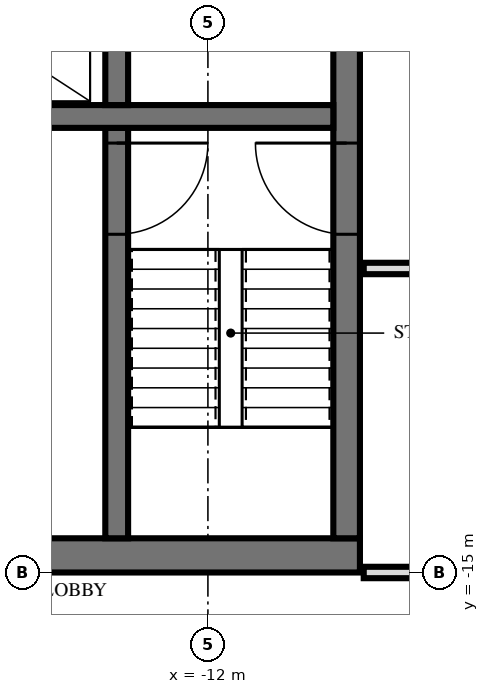
"""IFC4 building model, lengths in metres.
Left out: names, types, materials, properties, quantities, classifications, styles, units other than length and angle.
Written with IfcOpenShell. Run it as: python <this file> out.ifc"""

import sys

from ifc_helpers import new_model, si_unit, direction, frame, frame_2d, origin, place, context, subcontext, project, spatial, rectangle, extrude, element, fill, save


model = new_model("IFC4")
c1 = context("Model", 3, precision=1e-05, world=origin(), true_north=direction((0.0, 1.0)))
c2 = subcontext(c1, "Body", "Model", "MODEL_VIEW")
j1 = project(units=[si_unit("LENGTHUNIT", "METRE"), si_unit("PLANEANGLEUNIT", "RADIAN")], contexts=[c1])
p1 = place(None, origin())
s1 = spatial("IfcSite", under=j1, at=p1, CompositionType="ELEMENT")
p2 = place(p1, origin())
s2 = spatial("IfcBuilding", under=s1, at=p2, CompositionType="ELEMENT")
p3 = place(p2, frame((0.0, 0.0, 92.4)))
s3 = spatial("IfcBuildingStorey", under=s2, at=p3, CompositionType="ELEMENT", Elevation=92.4)
p4 = place(p3, frame((-29.5, -14.775, 0.0), z_axis=(0.0, 0.0, 1.0), x_axis=(1.0, 0.0, 0.0)))
e1 = element("IfcWall", 1, at=p4, inside=s3, PredefinedType="SHEAR", context=c2, shape_type="SweptSolid", body=[
    extrude(rectangle(XDim=19.5, YDim=0.45, at=frame_2d((9.75, 0.0))), origin(), (0.0, 0.0, 1.0), 3.6),
])
p5 = place(p4, frame((11.2, 0.0, 0.0)))
e2 = element("IfcOpeningElement", 2, at=p5, cuts=e1, PredefinedType="OPENING", context=c2, shape_type="SweptSolid", body=[
    extrude(rectangle(XDim=1.2, YDim=2.1, at=frame_2d((0.6, 1.05))), frame((0.0, 0.235, 0.0), z_axis=(0.0, -1.0, 0.0), x_axis=(1.0, 0.0, 0.0)), (0.0, 0.0, 1.0), 0.47),
])
p6 = place(p4, frame((14.25, 0.0, 0.0)))
e3 = element("IfcOpeningElement", 3, at=p6, cuts=e1, PredefinedType="OPENING", context=c2, shape_type="SweptSolid", body=[
    extrude(rectangle(XDim=1.1, YDim=2.1, at=frame_2d((0.55, 1.05))), frame((0.0, 0.235, 0.0), z_axis=(0.0, -1.0, 0.0), x_axis=(1.0, 0.0, 0.0)), (0.0, 0.0, 1.0), 0.47),
])
p7 = place(p4, frame((8.5, 0.0, 0.0)))
e4 = element("IfcOpeningElement", 4, at=p7, cuts=e1, PredefinedType="OPENING", context=c2, shape_type="SweptSolid", body=[
    extrude(rectangle(XDim=0.9, YDim=2.1, at=frame_2d((0.45, 1.05))), frame((0.0, 0.235, 0.0), z_axis=(0.0, -1.0, 0.0), x_axis=(1.0, 0.0, 0.0)), (0.0, 0.0, 1.0), 0.47),
])
p8 = place(p4, frame((6.05, 0.0, 0.0)))
e5 = element("IfcOpeningElement", 5, at=p8, cuts=e1, PredefinedType="OPENING", context=c2, shape_type="SweptSolid", body=[
    extrude(rectangle(XDim=1.0, YDim=2.1, at=frame_2d((0.5, 1.05))), frame((0.0, 0.235, 0.0), z_axis=(0.0, -1.0, 0.0), x_axis=(1.0, 0.0, 0.0)), (0.0, 0.0, 1.0), 0.47),
])
p9 = place(p4, frame((3.587, 0.0, 0.0)))
e6 = element("IfcOpeningElement", 6, at=p9, cuts=e1, PredefinedType="OPENING", context=c2, shape_type="SweptSolid", body=[
    extrude(rectangle(XDim=1.0, YDim=2.1, at=frame_2d((0.5, 1.05))), frame((0.0, 0.235, 0.0), z_axis=(0.0, -1.0, 0.0), x_axis=(1.0, 0.0, 0.0)), (0.0, 0.0, 1.0), 0.47),
])
p10 = place(p4, frame((1.85, 0.0, 0.0)))
e7 = element("IfcOpeningElement", 7, at=p10, cuts=e1, PredefinedType="OPENING", context=c2, shape_type="SweptSolid", body=[
    extrude(rectangle(XDim=1.0, YDim=2.1, at=frame_2d((0.5, 1.05))), frame((0.0, 0.235, 0.0), z_axis=(0.0, -1.0, 0.0), x_axis=(1.0, 0.0, 0.0)), (0.0, 0.0, 1.0), 0.47),
])
p11 = place(p4, frame((0.55, 0.0, 0.0)))
e8 = element("IfcOpeningElement", 8, at=p11, cuts=e1, PredefinedType="OPENING", context=c2, shape_type="SweptSolid", body=[
    extrude(rectangle(XDim=1.0, YDim=2.1, at=frame_2d((0.5, 1.05))), frame((0.0, 0.235, 0.0), z_axis=(0.0, -1.0, 0.0), x_axis=(1.0, 0.0, 0.0)), (0.0, 0.0, 1.0), 0.47),
])
p12 = place(p3, frame((-10.175, -14.55, 0.0), z_axis=(0.0, 0.0, 1.0), x_axis=(0.0, 1.0, 0.0)))
e9 = element("IfcWall", 9, at=p12, inside=s3, PredefinedType="SHEAR", context=c2, shape_type="SweptSolid", body=[
    extrude(rectangle(XDim=14.1, YDim=0.35, at=frame_2d((7.05, 0.0))), origin(), (0.0, 0.0, 1.0), 3.6),
])
p13 = place(p12, frame((8.4, 0.0, 0.0)))
e10 = element("IfcOpeningElement", 10, at=p13, cuts=e9, PredefinedType="OPENING", context=c2, shape_type="SweptSolid", body=[
    extrude(rectangle(XDim=1.4, YDim=2.4, at=frame_2d((0.7, 1.2))), frame((0.0, 0.185, 0.0), z_axis=(0.0, -1.0, 0.0), x_axis=(1.0, 0.0, 0.0)), (0.0, 0.0, 1.0), 0.37),
])
p14 = place(p12, frame((10.0, 0.0, 0.0)))
e11 = element("IfcOpeningElement", 11, at=p14, cuts=e9, PredefinedType="OPENING", context=c2, shape_type="SweptSolid", body=[
    extrude(rectangle(XDim=1.4, YDim=2.4, at=frame_2d((0.7, 1.2))), frame((0.0, 0.185, 0.0), z_axis=(0.0, -1.0, 0.0), x_axis=(1.0, 0.0, 0.0)), (0.0, 0.0, 1.0), 0.37),
])
p15 = place(p12, frame((4.0, 0.0, 0.0)))
e12 = element("IfcOpeningElement", 12, at=p15, cuts=e9, PredefinedType="OPENING", context=c2, shape_type="SweptSolid", body=[
    extrude(rectangle(XDim=1.2, YDim=2.1, at=frame_2d((0.6, 1.05))), frame((0.0, 0.185, 0.0), z_axis=(0.0, -1.0, 0.0), x_axis=(1.0, 0.0, 0.0)), (0.0, 0.0, 1.0), 0.37),
])
p16 = place(p3, frame((-29.05, -9.0, 0.0), z_axis=(0.0, 0.0, 1.0), x_axis=(1.0, 0.0, 0.0)))
e13 = element("IfcWall", 13, at=p16, inside=s3, PredefinedType="SHEAR", context=c2, shape_type="SweptSolid", body=[
    extrude(rectangle(XDim=18.7, YDim=0.3, at=frame_2d((9.35, 0.0))), origin(), (0.0, 0.0, 1.0), 3.6),
])
p17 = place(p16, frame((13.8, 0.0, 0.0)))
e14 = element("IfcOpeningElement", 14, at=p17, cuts=e13, PredefinedType="OPENING", context=c2, shape_type="SweptSolid", body=[
    extrude(rectangle(XDim=1.1, YDim=2.1, at=frame_2d((0.55, 1.05))), frame((0.0, 0.16, 0.0), z_axis=(0.0, -1.0, 0.0), x_axis=(1.0, 0.0, 0.0)), (0.0, 0.0, 1.0), 0.32),
])
p18 = place(p3, frame((-13.2, -8.85, 0.0), z_axis=(0.0, 0.0, 1.0), x_axis=(0.0, 1.0, 0.0)))
e15 = element("IfcWall", 15, at=p18, inside=s3, PredefinedType="SHEAR", context=c2, shape_type="SweptSolid", body=[
    extrude(rectangle(XDim=2.3, YDim=0.3, at=frame_2d((1.15, 0.0))), origin(), (0.0, 0.0, 1.0), 3.6),
])
p19 = place(p3, frame((-13.2, -14.55, 0.0), z_axis=(0.0, 0.0, 1.0), x_axis=(0.0, 1.0, 0.0)))
e16 = element("IfcWall", 16, at=p19, inside=s3, PredefinedType="SHEAR", context=c2, shape_type="SweptSolid", body=[
    extrude(rectangle(XDim=5.4, YDim=0.3, at=frame_2d((2.7, 0.0))), origin(), (0.0, 0.0, 1.0), 3.6),
])
p20 = place(p19, frame((4.0, 0.0, 0.0)))
e17 = element("IfcOpeningElement", 17, at=p20, cuts=e16, PredefinedType="OPENING", context=c2, shape_type="SweptSolid", body=[
    extrude(rectangle(XDim=1.2, YDim=2.1, at=frame_2d((0.6, 1.05))), frame((0.0, 0.16, 0.0), z_axis=(0.0, -1.0, 0.0), x_axis=(1.0, 0.0, 0.0)), (0.0, 0.0, 1.0), 0.32),
])
p21 = place(p3, frame((-9.95, -15.0, 0.0), z_axis=(0.0, 0.0, 1.0), x_axis=(1.0, 0.0, 0.0)))
e18 = element("IfcWall", 18, at=p21, inside=s3, PredefinedType="PARTITIONING", context=c2, shape_type="SweptSolid", body=[
    extrude(rectangle(XDim=19.9, YDim=0.15, at=frame_2d((9.95, 0.0))), origin(), (0.0, 0.0, 1.0), 2.684),
])
p22 = place(p21, frame((9.45, 0.0, 0.0)))
e19 = element("IfcOpeningElement", 19, at=p22, cuts=e18, PredefinedType="OPENING", context=c2, shape_type="SweptSolid", body=[
    extrude(rectangle(XDim=1.0, YDim=2.1, at=frame_2d((0.5, 1.05))), frame((0.0, 0.085, 0.0), z_axis=(0.0, -1.0, 0.0), x_axis=(1.0, 0.0, 0.0)), (0.0, 0.0, 1.0), 0.17),
])
p23 = place(p3, frame((-9.95, -11.0, 0.0), z_axis=(0.0, 0.0, 1.0), x_axis=(1.0, 0.0, 0.0)))
e20 = element("IfcWall", 20, at=p23, inside=s3, PredefinedType="PARTITIONING", context=c2, shape_type="SweptSolid", body=[
    extrude(rectangle(XDim=19.9, YDim=0.15, at=frame_2d((9.95, 0.0))), origin(), (0.0, 0.0, 1.0), 3.32),
])
p24 = place(p23, frame((9.45, 0.0, 0.0)))
e21 = element("IfcOpeningElement", 21, at=p24, cuts=e20, PredefinedType="OPENING", context=c2, shape_type="SweptSolid", body=[
    extrude(rectangle(XDim=1.0, YDim=2.1, at=frame_2d((0.5, 1.05))), frame((0.0, 0.085, 0.0), z_axis=(0.0, -1.0, 0.0), x_axis=(1.0, 0.0, 0.0)), (0.0, 0.0, 1.0), 0.17),
])
p25 = place(p23, frame((15.45, 0.0, 0.0)))
e22 = element("IfcOpeningElement", 22, at=p25, cuts=e20, PredefinedType="OPENING", context=c2, shape_type="SweptSolid", body=[
    extrude(rectangle(XDim=1.0, YDim=2.1, at=frame_2d((0.5, 1.05))), frame((0.0, 0.085, 0.0), z_axis=(0.0, -1.0, 0.0), x_axis=(1.0, 0.0, 0.0)), (0.0, 0.0, 1.0), 0.17),
])
p26 = place(p15, origin())
e23 = element("IfcDoor", 23, at=p26, inside=s3, OperationType="SINGLE_SWING_LEFT", PredefinedType="DOOR", context=c2, shape_type="SweptSolid", body=[
    extrude(rectangle(XDim=1.2, YDim=2.1, at=frame_2d((0.6, 1.05))), frame((0.0, 0.025, 0.0), z_axis=(0.0, -1.0, 0.0), x_axis=(1.0, 0.0, 0.0)), (0.0, 0.0, 1.0), 0.05),
])
fill(e12, e23)
p27 = place(p20, frame((0.6, 0.0, 0.0), z_axis=(0.0, 0.0, 1.0), x_axis=(-1.0, 0.0, 0.0)))
e24 = element("IfcDoor", 24, at=p27, inside=s3, OperationType="SINGLE_SWING_RIGHT", PredefinedType="DOOR", context=c2, shape_type="SweptSolid", body=[
    extrude(rectangle(XDim=1.2, YDim=2.1, at=frame_2d((0.0, 1.05))), frame((0.0, -0.025, 0.0), z_axis=(0.0, 1.0, 0.0), x_axis=(-1.0, 0.0, 0.0)), (0.0, 0.0, 1.0), 0.05),
])
fill(e17, e24)
save(model, sys.argv[1])
